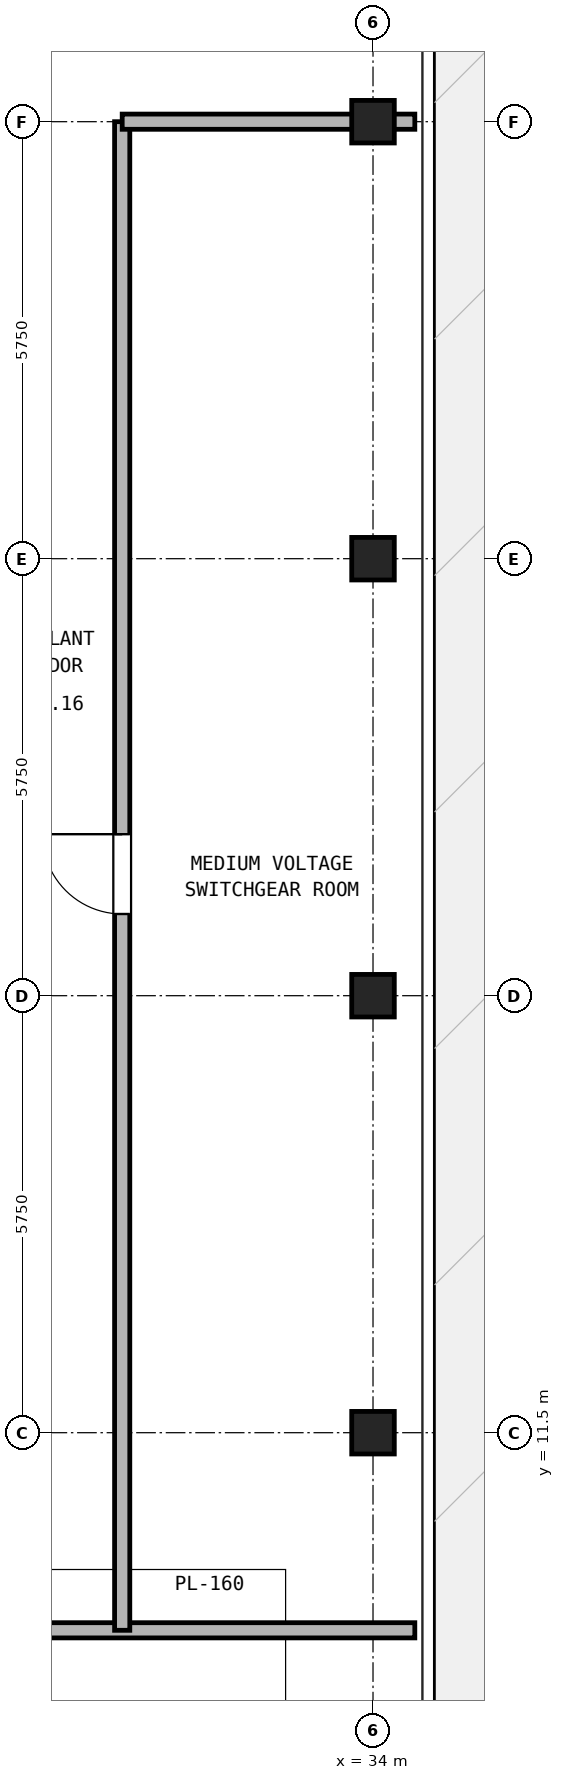
"""IFC4 building model, lengths in metres.
Left out: names, types, materials, properties, quantities, classifications, styles, units other than length and angle.
Written with IfcOpenShell. Run it as: python <this file> out.ifc"""

import sys

from ifc_helpers import new_model, si_unit, direction, frame, frame_2d, origin, origin_2d, place, context, subcontext, project, spatial, rectangle, hollow_rectangle, extrude, source, transform, mapped, element, fill, save


model = new_model("IFC4")
c1 = context("Model", 3, precision=1e-05, world=origin(), true_north=direction((0.0, 1.0)))
c2 = subcontext(c1, "Body", "Model", "MODEL_VIEW")
j1 = project(units=[si_unit("LENGTHUNIT", "METRE"), si_unit("PLANEANGLEUNIT", "RADIAN")], contexts=[c1])
p1 = place(None, origin())
s1 = spatial("IfcSite", under=j1, at=p1, CompositionType="ELEMENT")
p2 = place(p1, origin())
s2 = spatial("IfcBuilding", under=s1, at=p2, CompositionType="ELEMENT")
p3 = place(p2, frame((0.0, 0.0, 285.7)))
s3 = spatial("IfcBuildingStorey", under=s2, at=p3, CompositionType="ELEMENT", Elevation=285.7)
m1 = source(origin(), c2, "Body", "SweptSolid", [
    extrude(hollow_rectangle(XDim=0.56, YDim=0.56, WallThickness=0.03, at=origin_2d()), origin(), (0.0, 0.0, 1.0), 3.38),
])
for number, where, z_axis, x_axis in (
    (1, (34.0, 11.5, 0.0), (0.0, 0.0, 1.0), (1.0, 0.0, 0.0)),
    (2, (34.0, 17.25, 0.0), (0.0, 0.0, 1.0), (1.0, 0.0, 0.0)),
    (3, (34.0, 23.0, 0.0), (0.0, 0.0, 1.0), (1.0, 0.0, 0.0)),
    (4, (34.0, 28.75, 0.0), (0.0, 0.0, 1.0), (1.0, 0.0, 0.0)),
):
    element("IfcColumn", number, at=place(p3, frame(where, z_axis=z_axis, x_axis=x_axis)), inside=s3, PredefinedType="COLUMN", context=c2, shape_type="MappedRepresentation", body=[
        mapped(m1, transform((0.0, 0.0, 0.0), x_axis=(1.0, 0.0, 0.0), y_axis=(0.0, 1.0, 0.0), z_axis=(0.0, 0.0, 1.0), scale=1.0)),
    ])
p4 = place(p3, frame((12.45, 8.9, 0.0), z_axis=(0.0, 0.0, 1.0), x_axis=(1.0, 0.0, 0.0)))
e5 = element("IfcWall", 5, at=p4, inside=s3, PredefinedType="PARTITIONING", context=c2, shape_type="SweptSolid", body=[
    extrude(rectangle(XDim=22.1, YDim=0.2, at=frame_2d((11.05, 0.0))), origin(), (0.0, 0.0, 1.0), 3.38),
])
p5 = place(p4, frame((6.95, 0.0, 0.0)))
e6 = element("IfcOpeningElement", 6, at=p5, cuts=e5, PredefinedType="OPENING", context=c2, shape_type="SweptSolid", body=[
    extrude(rectangle(XDim=1.5, YDim=2.25, at=frame_2d((0.75, 1.125))), frame((0.0, 0.11, 0.0), z_axis=(0.0, -1.0, 0.0), x_axis=(1.0, 0.0, 0.0)), (0.0, 0.0, 1.0), 0.22),
])
p6 = place(p4, frame((14.15, 0.0, 0.0)))
e7 = element("IfcOpeningElement", 7, at=p6, cuts=e5, PredefinedType="OPENING", context=c2, shape_type="SweptSolid", body=[
    extrude(rectangle(XDim=1.5, YDim=2.25, at=frame_2d((0.75, 1.125))), frame((0.0, 0.11, 0.0), z_axis=(0.0, -1.0, 0.0), x_axis=(1.0, 0.0, 0.0)), (0.0, 0.0, 1.0), 0.22),
])
p7 = place(p3, frame((30.7, 8.9, 0.0), z_axis=(0.0, 0.0, 1.0), x_axis=(0.0, 1.0, 0.0)))
e8 = element("IfcWall", 8, at=p7, inside=s3, PredefinedType="PARTITIONING", context=c2, shape_type="SweptSolid", body=[
    extrude(rectangle(XDim=19.85, YDim=0.2, at=frame_2d((9.925, 0.0))), origin(), (0.0, 0.0, 1.0), 3.38),
])
p8 = place(p7, frame((9.425, 0.0, 0.0)))
e9 = element("IfcOpeningElement", 9, at=p8, cuts=e8, PredefinedType="OPENING", context=c2, shape_type="SweptSolid", body=[
    extrude(rectangle(XDim=1.05, YDim=2.15, at=frame_2d((0.525, 1.075))), frame((0.0, 0.11, 0.0), z_axis=(0.0, -1.0, 0.0), x_axis=(1.0, 0.0, 0.0)), (0.0, 0.0, 1.0), 0.22),
])
p9 = place(p3, frame((30.7, 28.75, 0.0), z_axis=(0.0, 0.0, 1.0), x_axis=(1.0, 0.0, 0.0)))
e10 = element("IfcWall", 10, at=p9, inside=s3, PredefinedType="PARTITIONING", context=c2, shape_type="SweptSolid", body=[
    extrude(rectangle(XDim=3.85, YDim=0.2, at=frame_2d((1.925, 0.0))), origin(), (0.0, 0.0, 1.0), 2.905),
])
p10 = place(p8, origin())
e11 = element("IfcDoor", 11, at=p10, inside=s3, OperationType="SINGLE_SWING_RIGHT", PredefinedType="DOOR", context=c2, shape_type="SweptSolid", body=[
    extrude(rectangle(XDim=1.05, YDim=2.15, at=frame_2d((0.525, 1.075))), frame((0.0, 0.025, 0.0), z_axis=(0.0, -1.0, 0.0), x_axis=(1.0, 0.0, 0.0)), (0.0, 0.0, 1.0), 0.05),
])
fill(e9, e11)
save(model, sys.argv[1])
